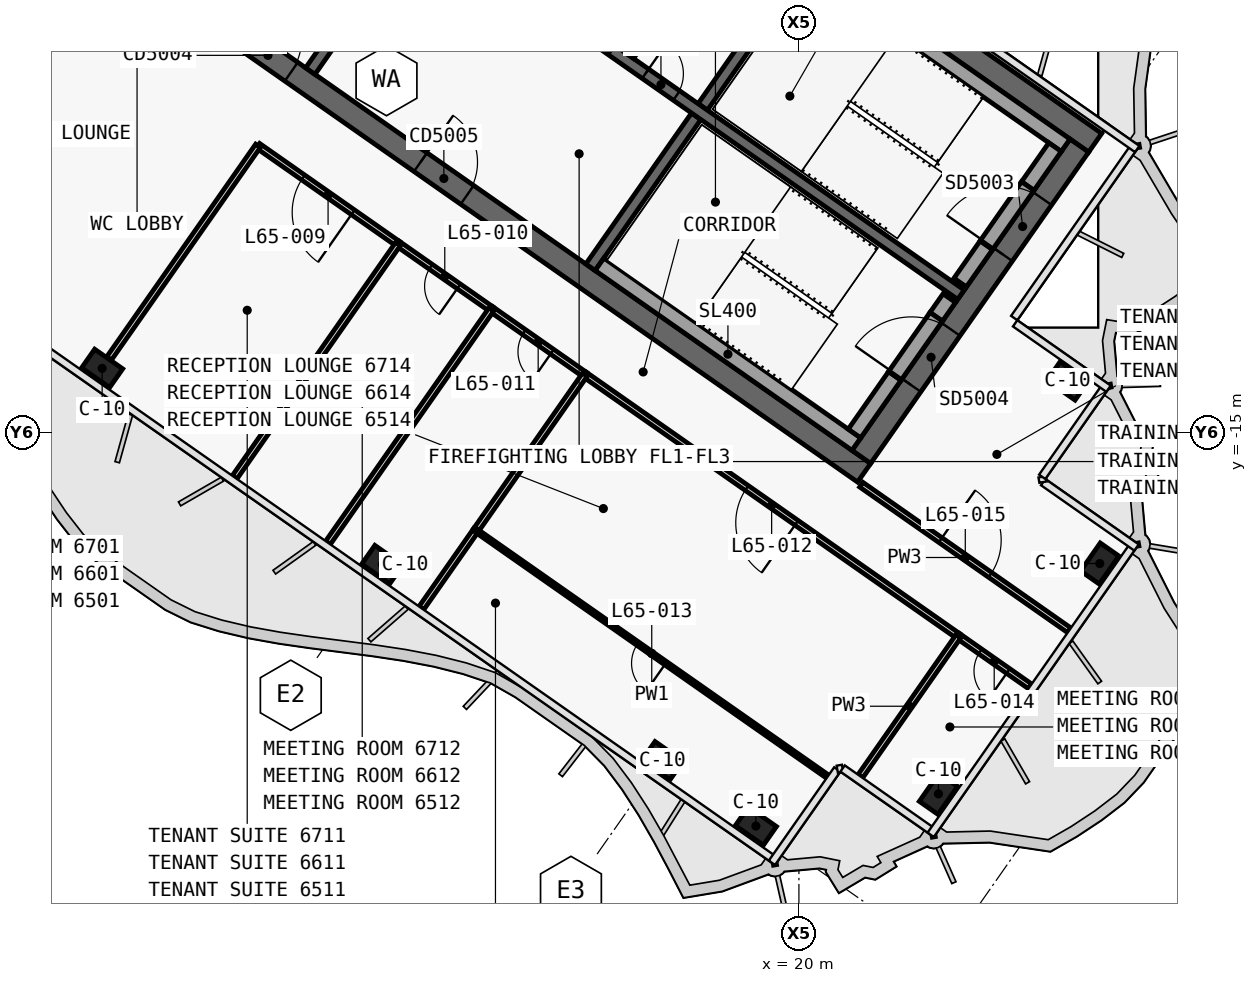
"""IFC4 building model, lengths in metres.
Left out: names, types, materials, properties, quantities, classifications, styles, units other than length and angle.
Written with IfcOpenShell. Run it as: python <this file> out.ifc"""

import sys

from ifc_helpers import new_model, si_unit, direction, frame, frame_2d, origin, origin_2d, place, context, subcontext, project, spatial, polyline, rectangle, outline, extrude, element, fill, save


model = new_model("IFC4")
c1 = context("Model", 3, precision=1e-05, world=origin(), true_north=direction((0.0, 1.0)))
c2 = subcontext(c1, "Body", "Model", "MODEL_VIEW")
j1 = project(units=[si_unit("LENGTHUNIT", "METRE"), si_unit("PLANEANGLEUNIT", "RADIAN")], contexts=[c1])
p1 = place(None, origin())
s1 = spatial("IfcSite", under=j1, at=p1, CompositionType="ELEMENT")
p2 = place(p1, origin())
s2 = spatial("IfcBuilding", under=s1, at=p2, CompositionType="ELEMENT")
p3 = place(p2, frame((0.0, 0.0, 276.1)))
s3 = spatial("IfcBuildingStorey", under=s2, at=p3, CompositionType="ELEMENT", Elevation=276.1)
p4 = place(p3, frame((0.028, 12.066, 0.0), z_axis=(0.0, 0.0, 1.0), x_axis=(0.819151382952, -0.573577380837, 0.0)))
e1 = element("IfcWall", 1, at=p4, inside=s3, PredefinedType="SHEAR", context=c2, shape_type="SweptSolid", body=[
    extrude(outline(polyline([(33.898, 0.3), (0.0, 0.3), (0.42, -0.3), (33.898, -0.3), (33.898, 0.3)])), origin(), (0.0, 0.0, 1.0), 3.9),
])
p5 = place(p3, frame((0.028, -0.874, 0.0), z_axis=(0.0, 0.0, 1.0), x_axis=(0.819150035022, -0.573579305871, 0.0)))
e2 = element("IfcWall", 2, at=p5, inside=s3, PredefinedType="SHEAR", context=c2, shape_type="SweptSolid", body=[
    extrude(outline(polyline([(26.476, 0.3), (0.0, 0.3), (0.42, -0.3), (26.476, -0.3), (26.476, 0.3)])), origin(), (0.0, 0.0, 1.0), 3.9),
])
p6 = place(p5, frame((6.576, 0.0, 0.0)))
e3 = element("IfcOpeningElement", 3, at=p6, cuts=e2, PredefinedType="OPENING", context=c2, shape_type="SweptSolid", body=[
    extrude(rectangle(XDim=1.5, YDim=2.1, at=frame_2d((0.75, 1.05))), frame((0.0, 0.31, 0.0), z_axis=(0.0, -1.0, 0.0), x_axis=(1.0, 0.0, 0.0)), (0.0, 0.0, 1.0), 0.62),
])
p7 = place(p5, frame((12.226, 0.0, 0.0)))
e4 = element("IfcOpeningElement", 4, at=p7, cuts=e2, PredefinedType="OPENING", context=c2, shape_type="SweptSolid", body=[
    extrude(rectangle(XDim=1.5, YDim=2.1, at=frame_2d((0.75, 1.05))), frame((0.0, 0.31, 0.0), z_axis=(0.0, -1.0, 0.0), x_axis=(1.0, 0.0, 0.0)), (0.0, 0.0, 1.0), 0.62),
])
p8 = place(p3, frame((21.642, -15.642, 0.0), z_axis=(0.0, 0.0, 1.0), x_axis=(0.573586866468, 0.819144740944, 0.0)))
e5 = element("IfcWall", 5, at=p8, inside=s3, PredefinedType="SHEAR", context=c2, shape_type="SweptSolid", body=[
    extrude(outline(polyline([(10.0, 0.3), (0.0, 0.3), (0.0, -0.3), (10.0, -0.3), (10.0, 0.3)])), origin(), (0.0, 0.0, 1.0), 3.9),
])
p9 = place(p8, frame((6.5, 0.0, 0.0)))
e6 = element("IfcOpeningElement", 6, at=p9, cuts=e5, PredefinedType="OPENING", context=c2, shape_type="SweptSolid", body=[
    extrude(rectangle(XDim=1.8, YDim=2.1, at=frame_2d((0.9, 1.05))), frame((0.0, 0.31, 0.0), z_axis=(0.0, -1.0, 0.0), x_axis=(1.0, 0.0, 0.0)), (0.0, 0.0, 1.0), 0.62),
])
p10 = place(p8, frame((2.3, 0.0, 0.0)))
e7 = element("IfcOpeningElement", 7, at=p10, cuts=e5, PredefinedType="OPENING", context=c2, shape_type="SweptSolid", body=[
    extrude(rectangle(XDim=1.8, YDim=2.1, at=frame_2d((0.9, 1.05))), frame((0.0, 0.31, 0.0), z_axis=(0.0, -1.0, 0.0), x_axis=(1.0, 0.0, 0.0)), (0.0, 0.0, 1.0), 0.62),
])
p11 = place(p3, frame((7.143, -5.49, 0.0), z_axis=(0.0, 0.0, 1.0), x_axis=(0.573617744349, 0.819123118565, 0.0)))
e8 = element("IfcWall", 8, at=p11, inside=s3, PredefinedType="SHEAR", context=c2, shape_type="SweptSolid", body=[
    extrude(outline(polyline([(0.0, 0.15), (0.0, -0.15), (4.85, -0.15), (4.85, 0.15), (0.0, 0.15)])), origin(), (0.0, 0.0, 1.0), 3.9),
])
p12 = place(p3, frame((14.515, -10.652, 0.0), z_axis=(0.0, 0.0, 1.0), x_axis=(0.573560315113, 0.819163332265, 0.0)))
e9 = element("IfcWall", 9, at=p12, inside=s3, PredefinedType="SHEAR", context=c2, shape_type="SweptSolid", body=[
    extrude(outline(polyline([(0.0, 0.15), (0.0, -0.15), (4.85, -0.15), (4.85, 0.15), (0.0, 0.15)])), origin(), (0.0, 0.0, 1.0), 3.9),
])
p13 = place(p3, frame((17.469, -6.433, 0.0), z_axis=(0.0, 0.0, 1.0), x_axis=(0.573594092424, 0.81913968109, 0.0)))
e10 = element("IfcWall", 10, at=p13, inside=s3, PredefinedType="SHEAR", context=c2, shape_type="SweptSolid", body=[
    extrude(outline(polyline([(4.85, -0.15), (4.85, 0.15), (0.0, 0.15), (0.0, -0.15), (4.85, -0.15)])), origin(), (0.0, 0.0, 1.0), 3.9),
])
p14 = place(p3, frame((2.638, 3.768, 0.0), z_axis=(0.0, 0.0, 1.0), x_axis=(0.819155014212, -0.573572194837, 0.0)))
e11 = element("IfcWall", 11, at=p14, inside=s3, PredefinedType="SHEAR", context=c2, shape_type="SweptSolid", body=[
    extrude(outline(polyline([(0.0, 0.15), (0.0, -0.15), (26.4, -0.15), (26.4, 0.15), (0.0, 0.15)])), origin(), (0.0, 0.0, 1.0), 3.9),
])
p15 = place(p14, frame((9.637, 0.0, 0.0)))
e12 = element("IfcOpeningElement", 12, at=p15, cuts=e11, PredefinedType="OPENING", context=c2, shape_type="SweptSolid", body=[
    extrude(rectangle(XDim=1.2, YDim=2.1, at=frame_2d((0.6, 1.05))), frame((0.0, 0.16, 0.0), z_axis=(0.0, -1.0, 0.0), x_axis=(1.0, 0.0, 0.0)), (0.0, 0.0, 1.0), 0.32),
])
p16 = place(p14, frame((11.812, 0.0, 0.0)))
e13 = element("IfcOpeningElement", 13, at=p16, cuts=e11, PredefinedType="OPENING", context=c2, shape_type="SweptSolid", body=[
    extrude(rectangle(XDim=1.2, YDim=2.1, at=frame_2d((0.6, 1.05))), frame((0.0, 0.16, 0.0), z_axis=(0.0, -1.0, 0.0), x_axis=(1.0, 0.0, 0.0)), (0.0, 0.0, 1.0), 0.32),
])
p17 = place(p14, frame((13.988, 0.0, 0.0)))
e14 = element("IfcOpeningElement", 14, at=p17, cuts=e11, PredefinedType="OPENING", context=c2, shape_type="SweptSolid", body=[
    extrude(rectangle(XDim=1.2, YDim=2.1, at=frame_2d((0.6, 1.05))), frame((0.0, 0.16, 0.0), z_axis=(0.0, -1.0, 0.0), x_axis=(1.0, 0.0, 0.0)), (0.0, 0.0, 1.0), 0.32),
])
p18 = place(p14, frame((16.262, 0.0, 0.0)))
e15 = element("IfcOpeningElement", 15, at=p18, cuts=e11, PredefinedType="OPENING", context=c2, shape_type="SweptSolid", body=[
    extrude(rectangle(XDim=1.0, YDim=2.1, at=frame_2d((0.5, 1.05))), frame((0.0, 0.16, 0.0), z_axis=(0.0, -1.0, 0.0), x_axis=(1.0, 0.0, 0.0)), (0.0, 0.0, 1.0), 0.32),
])
for number, where, z_axis, x_axis in (
    (16, (1.665, -13.313, 0.0), (0.0, 0.0, 1.0), (0.819, -0.574, 0.0)),
    (17, (9.038, -18.475, 0.0), (0.0, 0.0, 1.0), (0.819, -0.574, 0.0)),
    (18, (16.41, -23.637, 0.0), (0.0, 0.0, 1.0), (0.819, -0.574, 0.0)),
    (19, (18.867, -25.358, 0.0), (0.0, 0.0, 1.0), (0.819, -0.574, 0.0)),
    (20, (27.07, -13.644, 0.0), (0.0, 0.0, 1.0), (0.819, -0.574, 0.0)),
    (21, (23.672, -24.51, 0.0), (0.0, 0.0, 1.0), (0.574, 0.819, 0.0)),
    (22, (27.917, -18.449, 0.0), (0.0, 0.0, 1.0), (0.574, 0.819, 0.0)),
):
    element("IfcColumn", number, at=place(p3, frame(where, z_axis=z_axis, x_axis=x_axis)), inside=s3, PredefinedType="COLUMN", context=c2, shape_type="SweptSolid", body=[
        extrude(rectangle(XDim=0.9, YDim=0.6, at=origin_2d()), origin(), (0.0, 0.0, 1.0), 3.9),
    ])
p19 = place(p3, frame((15.565, -5.1, 0.0), z_axis=(0.0, 0.0, 1.0), x_axis=(0.573560315113, 0.819163332265, 0.0)))
e23 = element("IfcWall", 23, at=p19, inside=s3, PredefinedType="SOLIDWALL", context=c2, shape_type="SweptSolid", body=[
    extrude(rectangle(XDim=4.85, YDim=0.2, at=frame_2d((2.425, 0.0))), origin(), (0.0, 0.0, 1.0), 3.9),
])
p20 = place(p3, frame((20.259, -2.71, 0.0), z_axis=(0.0, 0.0, 1.0), x_axis=(0.81914849389, -0.573581506813, 0.0)))
e24 = element("IfcWall", 24, at=p20, inside=s3, PredefinedType="SOLIDWALL", context=c2, shape_type="SweptSolid", body=[
    extrude(rectangle(XDim=8.25, YDim=0.4, at=frame_2d((4.125, 0.0))), origin(), (0.0, 0.0, 1.0), 3.62),
])
p21 = place(p3, frame((24.244, -11.055, 0.0), z_axis=(0.0, 0.0, 1.0), x_axis=(0.573571582932, 0.819155442668, 0.0)))
e25 = element("IfcWall", 25, at=p21, inside=s3, PredefinedType="SOLIDWALL", context=c2, shape_type="SweptSolid", body=[
    extrude(rectangle(XDim=1.2, YDim=0.4, at=frame_2d((0.6, 0.0))), origin(), (0.0, 0.0, 1.0), 3.62),
])
p22 = place(p3, frame((26.022, -8.515, 0.0), z_axis=(0.0, 0.0, 1.0), x_axis=(0.573619628835, 0.819121798889, 0.0)))
e26 = element("IfcWall", 26, at=p22, inside=s3, PredefinedType="SOLIDWALL", context=c2, shape_type="SweptSolid", body=[
    extrude(rectangle(XDim=1.25, YDim=0.4, at=frame_2d((0.625, 0.0))), origin(), (0.0, 0.0, 1.0), 3.62),
])
p23 = place(p3, frame((24.932, -10.072, 2.15), z_axis=(0.0, 0.0, 1.0), x_axis=(0.573591692345, 0.819141361715, 0.0)))
e27 = element("IfcWall", 27, at=p23, inside=s3, PredefinedType="SOLIDWALL", context=c2, shape_type="SweptSolid", body=[
    extrude(rectangle(XDim=1.9, YDim=0.4, at=frame_2d((0.95, 0.0))), origin(), (0.0, 0.0, 1.0), 1.47),
])
p24 = place(p3, frame((14.753, -10.574, 0.0), z_axis=(0.0, 0.0, 1.0), x_axis=(0.819158229677, -0.573567602601, 0.0)))
e28 = element("IfcWall", 28, at=p24, inside=s3, PredefinedType="SOLIDWALL", context=c2, shape_type="SweptSolid", body=[
    extrude(rectangle(XDim=8.25, YDim=0.4, at=frame_2d((4.125, 0.0))), origin(), (0.0, 0.0, 1.0), 3.62),
])
p25 = place(p3, frame((21.462, -15.028, 0.0), z_axis=(0.0, 0.0, 1.0), x_axis=(0.573559770908, 0.819163713305, 0.0)))
e29 = element("IfcWall", 29, at=p25, inside=s3, PredefinedType="SOLIDWALL", context=c2, shape_type="SweptSolid", body=[
    extrude(rectangle(XDim=1.85, YDim=0.4, at=frame_2d((0.925, 0.0))), origin(), (0.0, 0.0, 1.0), 3.62),
])
p26 = place(p3, frame((23.613, -11.956, 0.0), z_axis=(0.0, 0.0, 1.0), x_axis=(0.573435029941, 0.819251039936, 0.0)))
e30 = element("IfcWall", 30, at=p26, inside=s3, PredefinedType="SOLIDWALL", context=c2, shape_type="SweptSolid", body=[
    extrude(rectangle(XDim=0.6, YDim=0.4, at=frame_2d((0.3, 0.0))), origin(), (0.0, 0.0, 1.0), 3.62),
])
p27 = place(p3, frame((22.523, -13.512, 2.15), z_axis=(0.0, 0.0, 1.0), x_axis=(0.573591692345, 0.819141361715, 0.0)))
e31 = element("IfcWall", 31, at=p27, inside=s3, PredefinedType="SOLIDWALL", context=c2, shape_type="SweptSolid", body=[
    extrude(rectangle(XDim=1.9, YDim=0.4, at=frame_2d((0.95, 0.0))), origin(), (0.0, 0.0, 1.0), 1.47),
])
p28 = place(p3, frame((21.642, -16.375, 0.0), z_axis=(0.0, 0.0, 1.0), x_axis=(0.819147777977, -0.573582529227, 0.0)))
e32 = element("IfcWall", 32, at=p28, inside=s3, PredefinedType="PARTITIONING", context=c2, shape_type="SweptSolid", body=[
    extrude(rectangle(XDim=6.68, YDim=0.15, at=frame_2d((3.34, 0.0))), origin(), (0.0, 0.0, 1.0), 3.0),
])
p29 = place(p28, frame((2.54, 0.0, 0.0)))
e33 = element("IfcOpeningElement", 33, at=p29, cuts=e32, PredefinedType="OPENING", context=c2, shape_type="SweptSolid", body=[
    extrude(rectangle(XDim=1.6, YDim=2.1, at=frame_2d((0.8, 1.05))), frame((0.0, 0.085, 0.0), z_axis=(0.0, -1.0, 0.0), x_axis=(1.0, 0.0, 0.0)), (0.0, 0.0, 1.0), 0.17),
])
p30 = place(p3, frame((9.454, -10.038, 0.0), z_axis=(0.0, 0.0, 1.0), x_axis=(-0.819142740634, 0.573589723117, 0.0)))
e34 = element("IfcWall", 34, at=p30, inside=s3, PredefinedType="PARTITIONING", context=c2, shape_type="SweptSolid", body=[
    extrude(rectangle(XDim=4.502, YDim=0.15, at=frame_2d((2.251, 0.0))), origin(), (0.0, 0.0, 1.0), 3.05),
])
p31 = place(p30, frame((1.451, 0.0, 0.0)))
e35 = element("IfcOpeningElement", 35, at=p31, cuts=e34, PredefinedType="OPENING", context=c2, shape_type="SweptSolid", body=[
    extrude(rectangle(XDim=1.6, YDim=2.1, at=frame_2d((0.8, 1.05))), frame((0.0, 0.085, 0.0), z_axis=(0.0, -1.0, 0.0), x_axis=(1.0, 0.0, 0.0)), (0.0, 0.0, 1.0), 0.17),
])
p32 = place(p3, frame((11.912, -11.759, 0.0), z_axis=(0.0, 0.0, 1.0), x_axis=(-0.81916700466, 0.573555070134, 0.0)))
e36 = element("IfcWall", 36, at=p32, inside=s3, PredefinedType="PARTITIONING", context=c2, shape_type="SweptSolid", body=[
    extrude(rectangle(XDim=3.004, YDim=0.15, at=frame_2d((1.502, 0.0))), origin(), (0.0, 0.0, 1.0), 3.62),
])
p33 = place(p32, frame((1.052, 0.0, 0.0)))
e37 = element("IfcOpeningElement", 37, at=p33, cuts=e36, PredefinedType="OPENING", context=c2, shape_type="SweptSolid", body=[
    extrude(rectangle(XDim=0.9, YDim=2.1, at=frame_2d((0.45, 1.05))), frame((0.0, 0.085, 0.0), z_axis=(0.0, -1.0, 0.0), x_axis=(1.0, 0.0, 0.0)), (0.0, 0.0, 1.0), 0.17),
])
p34 = place(p3, frame((14.369, -13.479, 0.0), z_axis=(0.0, 0.0, 1.0), x_axis=(-0.81916700466, 0.573555070134, 0.0)))
e38 = element("IfcWall", 38, at=p34, inside=s3, PredefinedType="PARTITIONING", context=c2, shape_type="SweptSolid", body=[
    extrude(rectangle(XDim=3.004, YDim=0.15, at=frame_2d((1.502, 0.0))), origin(), (0.0, 0.0, 1.0), 3.05),
])
p35 = place(p34, frame((1.052, 0.0, 0.0)))
e39 = element("IfcOpeningElement", 39, at=p35, cuts=e38, PredefinedType="OPENING", context=c2, shape_type="SweptSolid", body=[
    extrude(rectangle(XDim=0.9, YDim=2.1, at=frame_2d((0.45, 1.05))), frame((0.0, 0.085, 0.0), z_axis=(0.0, -1.0, 0.0), x_axis=(1.0, 0.0, 0.0)), (0.0, 0.0, 1.0), 0.17),
])
p36 = place(p3, frame((24.199, -20.362, 0.0), z_axis=(0.0, 0.0, 1.0), x_axis=(-0.819164075089, 0.573559254204, 0.0)))
e40 = element("IfcWall", 40, at=p36, inside=s3, PredefinedType="PARTITIONING", context=c2, shape_type="SweptSolid", body=[
    extrude(rectangle(XDim=12.004, YDim=0.15, at=frame_2d((6.002, 0.0))), origin(), (0.0, 0.0, 1.0), 3.05),
])
p37 = place(p36, frame((5.202, 0.0, 0.0)))
e41 = element("IfcOpeningElement", 41, at=p37, cuts=e40, PredefinedType="OPENING", context=c2, shape_type="SweptSolid", body=[
    extrude(rectangle(XDim=1.6, YDim=2.1, at=frame_2d((0.8, 1.05))), frame((0.0, 0.085, 0.0), z_axis=(0.0, -1.0, 0.0), x_axis=(1.0, 0.0, 0.0)), (0.0, 0.0, 1.0), 0.17),
])
p38 = place(p3, frame((26.081, -21.68, 0.0), z_axis=(0.0, 0.0, 1.0), x_axis=(-0.819172126429, 0.573547755014, 0.0)))
e42 = element("IfcWall", 42, at=p38, inside=s3, PredefinedType="PARTITIONING", context=c2, shape_type="SweptSolid", body=[
    extrude(rectangle(XDim=2.302, YDim=0.15, at=frame_2d((1.151, 0.0))), origin(), (0.0, 0.0, 1.0), 3.0),
])
p39 = place(p38, frame((0.701, 0.0, 0.0)))
e43 = element("IfcOpeningElement", 43, at=p39, cuts=e42, PredefinedType="OPENING", context=c2, shape_type="SweptSolid", body=[
    extrude(rectangle(XDim=0.9, YDim=2.1, at=frame_2d((0.45, 1.05))), frame((0.0, 0.085, 0.0), z_axis=(0.0, -1.0, 0.0), x_axis=(1.0, 0.0, 0.0)), (0.0, 0.0, 1.0), 0.17),
])
p40 = place(p3, frame((9.452, -10.037, 0.0), z_axis=(0.0, 0.0, 1.0), x_axis=(-0.573575945067, -0.81915238829, 0.0)))
e44 = element("IfcWall", 44, at=p40, inside=s3, PredefinedType="PARTITIONING", context=c2, shape_type="SweptSolid", body=[
    extrude(rectangle(XDim=7.5, YDim=0.15, at=frame_2d((3.75, 0.0))), origin(), (0.0, 0.0, 1.0), 3.0),
])
p41 = place(p3, frame((1.849, -13.051, 0.0), z_axis=(0.0, 0.0, 1.0), x_axis=(0.573577493031, 0.819151304393, 0.0)))
e45 = element("IfcWall", 45, at=p41, inside=s3, PredefinedType="PARTITIONING", context=c2, shape_type="SweptSolid", body=[
    extrude(rectangle(XDim=6.83, YDim=0.15, at=frame_2d((3.415, 0.0))), origin(), (0.0, 0.0, 1.0), 3.05),
])
p42 = place(p3, frame((11.91, -11.758, 0.0), z_axis=(0.0, 0.0, 1.0), x_axis=(-0.573560650686, -0.819163097304, 0.0)))
e46 = element("IfcWall", 46, at=p42, inside=s3, PredefinedType="PARTITIONING", context=c2, shape_type="SweptSolid", body=[
    extrude(rectangle(XDim=7.5, YDim=0.15, at=frame_2d((3.75, 0.0))), origin(), (0.0, 0.0, 1.0), 3.0),
])
p43 = place(p3, frame((11.5, -17.573, 0.0), z_axis=(0.0, 0.0, 1.0), x_axis=(-0.573501652684, -0.819204403289, 0.0)))
e47 = element("IfcWall", 47, at=p43, inside=s3, PredefinedType="PARTITIONING", context=c2, shape_type="SweptSolid", body=[
    extrude(rectangle(XDim=2.501, YDim=0.15, at=frame_2d((1.25, 0.0))), origin(), (0.0, 0.0, 1.0), 3.0),
])
p44 = place(p3, frame((14.367, -13.479, 0.0), z_axis=(0.0, 0.0, 1.0), x_axis=(-0.573613022702, -0.819126425033, 0.0)))
e48 = element("IfcWall", 48, at=p44, inside=s3, PredefinedType="PARTITIONING", context=c2, shape_type="SweptSolid", body=[
    extrude(rectangle(XDim=5.002, YDim=0.15, at=frame_2d((2.501, 0.0))), origin(), (0.0, 0.0, 1.0), 3.62),
])
p45 = place(p3, frame((20.755, -24.056, 0.0), z_axis=(0.0, 0.0, 1.0), x_axis=(-0.819148680192, 0.573581240749, 0.0)))
e49 = element("IfcWall", 49, at=p45, inside=s3, PredefinedType="PARTITIONING", context=c2, shape_type="SweptSolid", body=[
    extrude(rectangle(XDim=11.3, YDim=0.1, at=frame_2d((5.65, 0.0))), origin(), (0.0, 0.0, 1.0), 3.05),
])
p46 = place(p45, frame((5.2, 0.0, 0.0)))
e50 = element("IfcOpeningElement", 50, at=p46, cuts=e49, PredefinedType="OPENING", context=c2, shape_type="SweptSolid", body=[
    extrude(rectangle(XDim=0.9, YDim=2.1, at=frame_2d((0.45, 1.05))), frame((0.0, 0.06, 0.0), z_axis=(0.0, -1.0, 0.0), x_axis=(1.0, 0.0, 0.0)), (0.0, 0.0, 1.0), 0.12),
])
p47 = place(p3, frame((24.197, -20.361, 0.0), z_axis=(0.0, 0.0, 1.0), x_axis=(-0.573560650686, -0.819163097304, 0.0)))
e51 = element("IfcWall", 51, at=p47, inside=s3, PredefinedType="PARTITIONING", context=c2, shape_type="SweptSolid", body=[
    extrude(rectangle(XDim=4.5, YDim=0.15, at=frame_2d((2.25, 0.0))), origin(), (0.0, 0.0, 1.0), 3.05),
])
p48 = place(p18, origin())
e52 = element("IfcDoor", 52, at=p48, inside=s3, OperationType="SINGLE_SWING_RIGHT", PredefinedType="DOOR", context=c2, shape_type="SweptSolid", body=[
    extrude(rectangle(XDim=1.0, YDim=2.1, at=frame_2d((0.5, 1.05))), frame((0.0, 0.025, 0.0), z_axis=(0.0, -1.0, 0.0), x_axis=(1.0, 0.0, 0.0)), (0.0, 0.0, 1.0), 0.05),
])
fill(e15, e52)
p49 = place(p6, origin())
e53 = element("IfcDoor", 53, at=p49, inside=s3, OperationType="SINGLE_SWING_RIGHT", PredefinedType="DOOR", context=c2, shape_type="SweptSolid", body=[
    extrude(rectangle(XDim=1.5, YDim=2.1, at=frame_2d((0.75, 1.05))), frame((0.0, 0.025, 0.0), z_axis=(0.0, -1.0, 0.0), x_axis=(1.0, 0.0, 0.0)), (0.0, 0.0, 1.0), 0.05),
])
fill(e3, e53)
p50 = place(p7, origin())
e54 = element("IfcDoor", 54, at=p50, inside=s3, OperationType="DOUBLE_DOOR_SINGLE_SWING", PredefinedType="DOOR", context=c2, shape_type="SweptSolid", body=[
    extrude(rectangle(XDim=1.5, YDim=2.1, at=frame_2d((0.75, 1.05))), frame((0.0, 0.025, 0.0), z_axis=(0.0, -1.0, 0.0), x_axis=(1.0, 0.0, 0.0)), (0.0, 0.0, 1.0), 0.05),
])
fill(e4, e54)
p51 = place(p9, origin())
e55 = element("IfcDoor", 55, at=p51, inside=s3, OperationType="DOUBLE_DOOR_SINGLE_SWING", PredefinedType="DOOR", context=c2, shape_type="SweptSolid", body=[
    extrude(rectangle(XDim=1.8, YDim=2.1, at=frame_2d((0.9, 1.05))), frame((0.0, 0.025, 0.0), z_axis=(0.0, -1.0, 0.0), x_axis=(1.0, 0.0, 0.0)), (0.0, 0.0, 1.0), 0.05),
])
fill(e6, e55)
p52 = place(p10, origin())
e56 = element("IfcDoor", 56, at=p52, inside=s3, OperationType="DOUBLE_DOOR_SINGLE_SWING", PredefinedType="DOOR", context=c2, shape_type="SweptSolid", body=[
    extrude(rectangle(XDim=1.8, YDim=2.1, at=frame_2d((0.9, 1.05))), frame((0.0, 0.025, 0.0), z_axis=(0.0, -1.0, 0.0), x_axis=(1.0, 0.0, 0.0)), (0.0, 0.0, 1.0), 0.05),
])
fill(e7, e56)
p53 = place(p31, origin())
e57 = element("IfcDoor", 57, at=p53, inside=s3, OperationType="DOUBLE_DOOR_SINGLE_SWING", PredefinedType="DOOR", context=c2, shape_type="SweptSolid", body=[
    extrude(rectangle(XDim=1.6, YDim=2.1, at=frame_2d((0.8, 1.05))), frame((0.0, 0.025, 0.0), z_axis=(0.0, -1.0, 0.0), x_axis=(1.0, 0.0, 0.0)), (0.0, 0.0, 1.0), 0.05),
])
fill(e35, e57)
p54 = place(p33, origin())
e58 = element("IfcDoor", 58, at=p54, inside=s3, OperationType="SINGLE_SWING_LEFT", PredefinedType="DOOR", context=c2, shape_type="SweptSolid", body=[
    extrude(rectangle(XDim=0.9, YDim=2.1, at=frame_2d((0.45, 1.05))), frame((0.0, 0.025, 0.0), z_axis=(0.0, -1.0, 0.0), x_axis=(1.0, 0.0, 0.0)), (0.0, 0.0, 1.0), 0.05),
])
fill(e37, e58)
p55 = place(p35, origin())
e59 = element("IfcDoor", 59, at=p55, inside=s3, OperationType="SINGLE_SWING_RIGHT", PredefinedType="DOOR", context=c2, shape_type="SweptSolid", body=[
    extrude(rectangle(XDim=0.9, YDim=2.1, at=frame_2d((0.45, 1.05))), frame((0.0, 0.025, 0.0), z_axis=(0.0, -1.0, 0.0), x_axis=(1.0, 0.0, 0.0)), (0.0, 0.0, 1.0), 0.05),
])
fill(e39, e59)
p56 = place(p37, origin())
e60 = element("IfcDoor", 60, at=p56, inside=s3, OperationType="DOUBLE_DOOR_SINGLE_SWING", PredefinedType="DOOR", context=c2, shape_type="SweptSolid", body=[
    extrude(rectangle(XDim=1.6, YDim=2.1, at=frame_2d((0.8, 1.05))), frame((0.0, 0.025, 0.0), z_axis=(0.0, -1.0, 0.0), x_axis=(1.0, 0.0, 0.0)), (0.0, 0.0, 1.0), 0.05),
])
fill(e41, e60)
p57 = place(p46, origin())
e61 = element("IfcDoor", 61, at=p57, inside=s3, OperationType="SINGLE_SWING_RIGHT", PredefinedType="DOOR", context=c2, shape_type="SweptSolid", body=[
    extrude(rectangle(XDim=0.9, YDim=2.1, at=frame_2d((0.45, 1.05))), frame((0.0, 0.025, 0.0), z_axis=(0.0, -1.0, 0.0), x_axis=(1.0, 0.0, 0.0)), (0.0, 0.0, 1.0), 0.05),
])
fill(e50, e61)
p58 = place(p39, origin())
e62 = element("IfcDoor", 62, at=p58, inside=s3, OperationType="SINGLE_SWING_RIGHT", PredefinedType="DOOR", context=c2, shape_type="SweptSolid", body=[
    extrude(rectangle(XDim=0.9, YDim=2.1, at=frame_2d((0.45, 1.05))), frame((0.0, 0.025, 0.0), z_axis=(0.0, -1.0, 0.0), x_axis=(1.0, 0.0, 0.0)), (0.0, 0.0, 1.0), 0.05),
])
fill(e43, e62)
p59 = place(p29, origin())
e63 = element("IfcDoor", 63, at=p59, inside=s3, OperationType="DOUBLE_DOOR_SINGLE_SWING", PredefinedType="DOOR", context=c2, shape_type="SweptSolid", body=[
    extrude(rectangle(XDim=1.6, YDim=2.1, at=frame_2d((0.8, 1.05))), frame((0.0, 0.025, 0.0), z_axis=(0.0, -1.0, 0.0), x_axis=(1.0, 0.0, 0.0)), (0.0, 0.0, 1.0), 0.05),
])
fill(e33, e63)
save(model, sys.argv[1])
